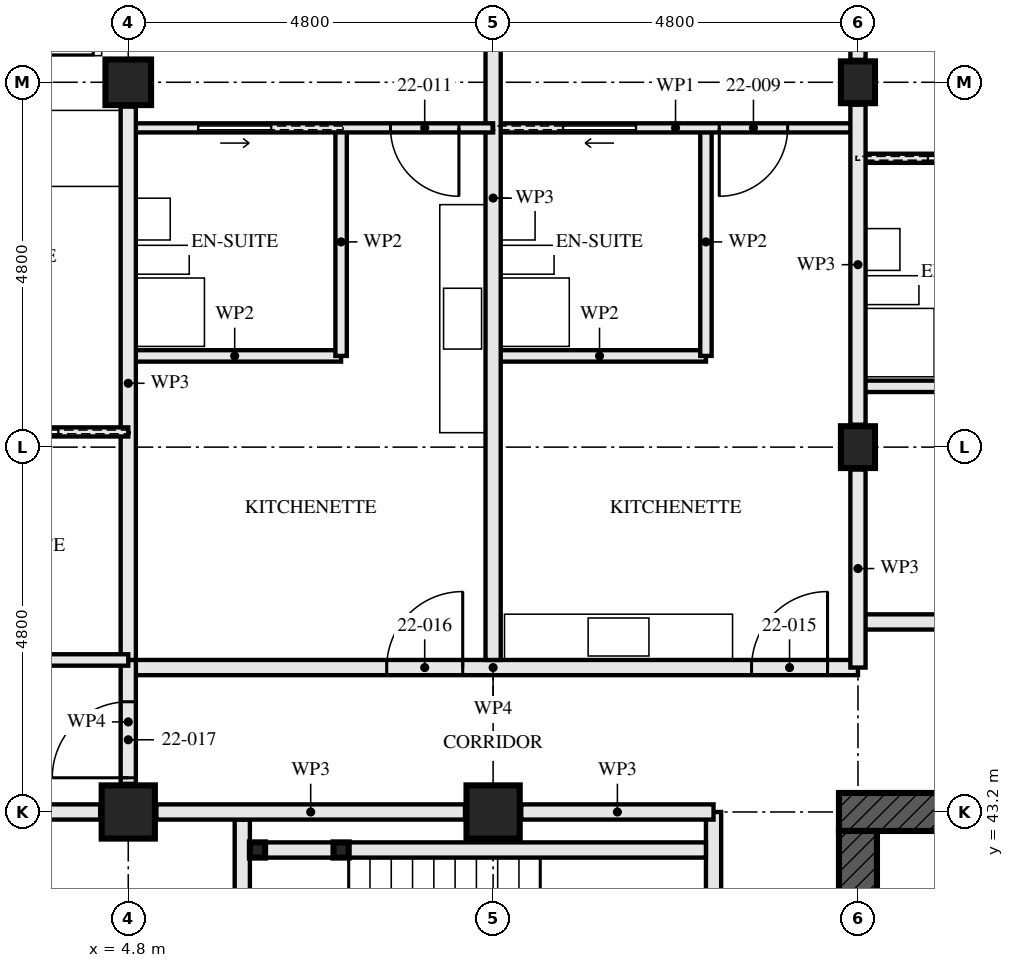
"""IFC4 building model, lengths in metres.
Left out: names, types, materials, properties, quantities, classifications, styles, units other than length and angle.
Written with IfcOpenShell. Run it as: python <this file> out.ifc"""

import sys

from ifc_helpers import new_model, si_unit, direction, frame, frame_2d, origin, origin_2d, place, context, subcontext, project, spatial, rectangle, hollow_rectangle, i_section, extrude, element, fill, save


model = new_model("IFC4")
c1 = context("Model", 3, precision=1e-05, world=origin(), true_north=direction((0.0, 1.0)))
c2 = subcontext(c1, "Body", "Model", "MODEL_VIEW")
j1 = project(units=[si_unit("LENGTHUNIT", "METRE"), si_unit("PLANEANGLEUNIT", "RADIAN")], contexts=[c1])
p1 = place(None, origin())
s1 = spatial("IfcSite", under=j1, at=p1, CompositionType="ELEMENT")
p2 = place(p1, origin())
s2 = spatial("IfcBuilding", under=s1, at=p2, CompositionType="ELEMENT")
p3 = place(p2, frame((0.0, 0.0, 84.0)))
s3 = spatial("IfcBuildingStorey", under=s2, at=p3, CompositionType="ELEMENT", Elevation=84.0)
p4 = place(p3, frame((4.8, 43.2, 0.0), z_axis=(0.0, 0.0, 1.0), x_axis=(0.0, 1.0, 0.0)))
e1 = element("IfcColumn", 1, at=p4, inside=s3, PredefinedType="COLUMN", context=c2, shape_type="SweptSolid", body=[
    extrude(hollow_rectangle(XDim=0.7, YDim=0.7, WallThickness=0.06, at=origin_2d()), origin(), (0.0, 0.0, 1.0), 3.5),
])
p5 = place(p3, frame((4.8, 52.8, 0.0), z_axis=(0.0, 0.0, 1.0), x_axis=(0.0, 1.0, 0.0)))
e2 = element("IfcColumn", 2, at=p5, inside=s3, PredefinedType="COLUMN", context=c2, shape_type="SweptSolid", body=[
    extrude(hollow_rectangle(XDim=0.6, YDim=0.6, WallThickness=0.05, at=origin_2d()), origin(), (0.0, 0.0, 1.0), 3.5),
])
p6 = place(p3, frame((9.6, 43.2, 0.0), z_axis=(0.0, 0.0, 1.0), x_axis=(0.0, 1.0, 0.0)))
e3 = element("IfcColumn", 3, at=p6, inside=s3, PredefinedType="COLUMN", context=c2, shape_type="SweptSolid", body=[
    extrude(hollow_rectangle(XDim=0.7, YDim=0.7, WallThickness=0.06, at=origin_2d()), origin(), (0.0, 0.0, 1.0), 3.5),
])
for number, where, z_axis, x_axis in (
    (4, (14.4, 48.0, 0.0), (0.0, 0.0, 1.0), (1.0, 0.0, 0.0)),
    (5, (14.4, 52.8, 0.0), (0.0, 0.0, 1.0), (1.0, 0.0, 0.0)),
):
    element("IfcColumn", number, at=place(p3, frame(where, z_axis=z_axis, x_axis=x_axis)), inside=s3, PredefinedType="COLUMN", context=c2, shape_type="SweptSolid", body=[
        extrude(i_section(OverallWidth=0.448, OverallDepth=0.55, WebThickness=0.072, FlangeThickness=0.115, FilletRadius=0.015, at=origin_2d()), origin(), (0.0, 0.0, 1.0), 3.5),
    ])
p7 = place(p3, frame((29.05, 43.2, -0.17), z_axis=(0.0, 0.0, 1.0), x_axis=(-1.0, 0.0, 0.0)))
e6 = element("IfcWall", 6, at=p7, inside=s3, PredefinedType="SHEAR", context=c2, shape_type="SweptSolid", body=[
    extrude(rectangle(XDim=14.9, YDim=0.5, at=frame_2d((7.45, 0.0))), origin(), (0.0, 0.0, 1.0), 3.5),
])
p8 = place(p7, frame((6.85, 0.0, 0.17)))
e7 = element("IfcOpeningElement", 7, at=p8, cuts=e6, PredefinedType="OPENING", context=c2, shape_type="SweptSolid", body=[
    extrude(rectangle(XDim=1.2, YDim=2.1, at=frame_2d((0.6, 1.05))), frame((0.0, 0.26, 0.0), z_axis=(0.0, -1.0, 0.0), x_axis=(1.0, 0.0, 0.0)), (0.0, 0.0, 1.0), 0.521),
])
p9 = place(p3, frame((14.4, 42.95, -0.17), z_axis=(0.0, 0.0, 1.0), x_axis=(0.0, -1.0, 0.0)))
e8 = element("IfcWall", 8, at=p9, inside=s3, PredefinedType="SHEAR", context=c2, shape_type="SweptSolid", body=[
    extrude(rectangle(XDim=13.9, YDim=0.5, at=frame_2d((6.95, 0.0))), origin(), (0.0, 0.0, 1.0), 3.5),
])
p10 = place(p9, frame((6.35, 0.0, 0.17)))
e9 = element("IfcOpeningElement", 9, at=p10, cuts=e8, PredefinedType="OPENING", context=c2, shape_type="SweptSolid", body=[
    extrude(rectangle(XDim=1.2, YDim=2.1, at=frame_2d((0.6, 1.05))), frame((0.0, 0.26, 0.0), z_axis=(0.0, -1.0, 0.0), x_axis=(1.0, 0.0, 0.0)), (0.0, 0.0, 1.0), 0.521),
])
for number, where, z_axis, x_axis in (
    (10, (6.5, 42.7, 0.0), (0.0, 0.0, 1.0), (1.0, 0.0, 0.0)),
    (11, (7.6, 42.7, 0.0), (0.0, 0.0, 1.0), (1.0, 0.0, 0.0)),
):
    element("IfcColumn", number, at=place(p3, frame(where, z_axis=z_axis, x_axis=x_axis)), inside=s3, PredefinedType="COLUMN", context=c2, shape_type="SweptSolid", body=[
        extrude(hollow_rectangle(XDim=0.2, YDim=0.2, WallThickness=0.008, at=origin_2d()), origin(), (0.0, 0.0, 1.0), 3.33),
    ])
p11 = place(p3, frame((6.6, 42.7, 0.0), z_axis=(0.0, 0.0, 1.0), x_axis=(1.0, 0.0, 0.0)))
e12 = element("IfcWall", 12, at=p11, inside=s3, PredefinedType="SOLIDWALL", context=c2, shape_type="SweptSolid", body=[
    extrude(rectangle(XDim=0.9, YDim=0.2, at=frame_2d((0.45, 0.0))), origin(), (0.0, 0.0, 1.0), 2.99),
])
p12 = place(p3, frame((7.7, 42.7, 0.0), z_axis=(0.0, 0.0, 1.0), x_axis=(1.0, 0.0, 0.0)))
e13 = element("IfcWall", 13, at=p12, inside=s3, PredefinedType="SOLIDWALL", context=c2, shape_type="SweptSolid", body=[
    extrude(rectangle(XDim=4.7, YDim=0.2, at=frame_2d((2.35, 0.0))), origin(), (0.0, 0.0, 1.0), 2.99),
])
p13 = place(p3, frame((6.3, 43.1, 0.0), z_axis=(0.0, 0.0, 1.0), x_axis=(0.0, -1.0, 0.0)))
e14 = element("IfcWall", 14, at=p13, inside=s3, PredefinedType="SOLIDWALL", context=c2, shape_type="SweptSolid", body=[
    extrude(rectangle(XDim=3.3, YDim=0.2, at=frame_2d((1.65, 0.0))), origin(), (0.0, 0.0, 1.0), 3.33),
])
p14 = place(p3, frame((12.5, 43.2, 0.0), z_axis=(0.0, 0.0, 1.0), x_axis=(0.0, -1.0, 0.0)))
e15 = element("IfcWall", 15, at=p14, inside=s3, PredefinedType="PARTITIONING", context=c2, shape_type="SweptSolid", body=[
    extrude(rectangle(XDim=12.4, YDim=0.2, at=frame_2d((6.2, 0.0))), origin(), (0.0, 0.0, 1.0), 2.55),
])
p15 = place(p14, frame((1.4, 0.0, 0.0)))
e16 = element("IfcOpeningElement", 16, at=p15, cuts=e15, PredefinedType="OPENING", context=c2, shape_type="SweptSolid", body=[
    extrude(rectangle(XDim=1.0, YDim=2.1, at=frame_2d((0.5, 1.05))), frame((0.0, 0.111, 0.0), z_axis=(0.0, -1.0, 0.0), x_axis=(1.0, 0.0, 0.0)), (0.0, 0.0, 1.0), 0.221),
])
p16 = place(p14, frame((5.2, 0.0, 0.0)))
e17 = element("IfcOpeningElement", 17, at=p16, cuts=e15, PredefinedType="OPENING", context=c2, shape_type="SweptSolid", body=[
    extrude(rectangle(XDim=1.0, YDim=2.1, at=frame_2d((0.5, 1.05))), frame((0.0, 0.111, 0.0), z_axis=(0.0, -1.0, 0.0), x_axis=(1.0, 0.0, 0.0)), (0.0, 0.0, 1.0), 0.221),
])
p17 = place(p3, frame((12.4, 52.2, 0.0), z_axis=(0.0, 0.0, 1.0), x_axis=(0.0, -1.0, 0.0)))
e18 = element("IfcWall", 18, at=p17, inside=s3, PredefinedType="PARTITIONING", context=c2, shape_type="SweptSolid", body=[
    extrude(rectangle(XDim=3.0, YDim=0.15, at=frame_2d((1.5, 0.0))), origin(), (0.0, 0.0, 1.0), 3.33),
])
p18 = place(p3, frame((12.4, 49.2, 0.0), z_axis=(0.0, 0.0, 1.0), x_axis=(-1.0, 0.0, 0.0)))
e19 = element("IfcWall", 19, at=p18, inside=s3, PredefinedType="PARTITIONING", context=c2, shape_type="SweptSolid", body=[
    extrude(rectangle(XDim=2.8, YDim=0.15, at=frame_2d((1.4, 0.0))), origin(), (0.0, 0.0, 1.0), 3.33),
])
p19 = place(p3, frame((14.4, 52.2, 0.0), z_axis=(0.0, 0.0, 1.0), x_axis=(-1.0, 0.0, 0.0)))
e20 = element("IfcWall", 20, at=p19, inside=s3, PredefinedType="PARTITIONING", context=c2, shape_type="SweptSolid", body=[
    extrude(rectangle(XDim=4.8, YDim=0.12, at=frame_2d((2.4, 0.0))), origin(), (0.0, 0.0, 1.0), 3.33),
])
p20 = place(p19, frame((0.925, 0.0, 0.0)))
e21 = element("IfcOpeningElement", 21, at=p20, cuts=e20, PredefinedType="OPENING", context=c2, shape_type="SweptSolid", body=[
    extrude(rectangle(XDim=0.9, YDim=2.1, at=frame_2d((0.45, 1.05))), frame((0.0, 0.071, 0.0), z_axis=(0.0, -1.0, 0.0), x_axis=(1.0, 0.0, 0.0)), (0.0, 0.0, 1.0), 0.141),
])
p21 = place(p19, frame((2.925, 0.0, 0.0)))
e22 = element("IfcOpeningElement", 22, at=p21, cuts=e20, PredefinedType="OPENING", context=c2, shape_type="SweptSolid", body=[
    extrude(rectangle(XDim=0.95, YDim=2.1, at=frame_2d((0.475, 1.05))), frame((0.0, 0.071, 0.0), z_axis=(0.0, -1.0, 0.0), x_axis=(1.0, 0.0, 0.0)), (0.0, 0.0, 1.0), 0.141),
])
p22 = place(p3, frame((9.6, 57.353, 0.0), z_axis=(0.0, 0.0, 1.0), x_axis=(0.0, -1.0, 0.0)))
e23 = element("IfcWall", 23, at=p22, inside=s3, PredefinedType="PARTITIONING", context=c2, shape_type="SweptSolid", body=[
    extrude(rectangle(XDim=12.153, YDim=0.2, at=frame_2d((6.077, 0.0))), origin(), (0.0, 0.0, 1.0), 2.55),
])
p23 = place(p3, frame((7.6, 52.2, 0.0), z_axis=(0.0, 0.0, 1.0), x_axis=(0.0, -1.0, 0.0)))
e24 = element("IfcWall", 24, at=p23, inside=s3, PredefinedType="PARTITIONING", context=c2, shape_type="SweptSolid", body=[
    extrude(rectangle(XDim=3.0, YDim=0.15, at=frame_2d((1.5, 0.0))), origin(), (0.0, 0.0, 1.0), 3.33),
])
p24 = place(p3, frame((7.6, 49.2, 0.0), z_axis=(0.0, 0.0, 1.0), x_axis=(-1.0, 0.0, 0.0)))
e25 = element("IfcWall", 25, at=p24, inside=s3, PredefinedType="PARTITIONING", context=c2, shape_type="SweptSolid", body=[
    extrude(rectangle(XDim=2.8, YDim=0.15, at=frame_2d((1.4, 0.0))), origin(), (0.0, 0.0, 1.0), 3.33),
])
p25 = place(p3, frame((9.6, 52.2, 0.0), z_axis=(0.0, 0.0, 1.0), x_axis=(-1.0, 0.0, 0.0)))
e26 = element("IfcWall", 26, at=p25, inside=s3, PredefinedType="PARTITIONING", context=c2, shape_type="SweptSolid", body=[
    extrude(rectangle(XDim=4.8, YDim=0.12, at=frame_2d((2.4, 0.0))), origin(), (0.0, 0.0, 1.0), 3.33),
])
p26 = place(p25, frame((0.45, 0.0, 0.0)))
e27 = element("IfcOpeningElement", 27, at=p26, cuts=e26, PredefinedType="OPENING", context=c2, shape_type="SweptSolid", body=[
    extrude(rectangle(XDim=0.9, YDim=2.1, at=frame_2d((0.45, 1.05))), frame((0.0, 0.071, 0.0), z_axis=(0.0, -1.0, 0.0), x_axis=(1.0, 0.0, 0.0)), (0.0, 0.0, 1.0), 0.141),
])
p27 = place(p25, frame((2.925, 0.0, 0.0)))
e28 = element("IfcOpeningElement", 28, at=p27, cuts=e26, PredefinedType="OPENING", context=c2, shape_type="SweptSolid", body=[
    extrude(rectangle(XDim=0.95, YDim=2.1, at=frame_2d((0.475, 1.05))), frame((0.0, 0.071, 0.0), z_axis=(0.0, -1.0, 0.0), x_axis=(1.0, 0.0, 0.0)), (0.0, 0.0, 1.0), 0.141),
])
p28 = place(p3, frame((4.8, 52.48, 0.0), z_axis=(0.0, 0.0, 1.0), x_axis=(0.0, -1.0, 0.0)))
e29 = element("IfcWall", 29, at=p28, inside=s3, PredefinedType="PARTITIONING", context=c2, shape_type="SweptSolid", body=[
    extrude(rectangle(XDim=7.28, YDim=0.2, at=frame_2d((3.64, 0.0))), origin(), (0.0, 0.0, 1.0), 2.55),
])
p29 = place(p3, frame((4.8, 45.2, 0.0), z_axis=(0.0, 0.0, 1.0), x_axis=(-1.0, 0.0, 0.0)))
e30 = element("IfcWall", 30, at=p29, inside=s3, PredefinedType="PARTITIONING", context=c2, shape_type="SweptSolid", body=[
    extrude(rectangle(XDim=2.8, YDim=0.15, at=frame_2d((1.4, 0.0))), origin(), (0.0, 0.0, 1.0), 3.33),
])
p30 = place(p3, frame((4.8, 48.2, 0.0), z_axis=(0.0, 0.0, 1.0), x_axis=(-1.0, 0.0, 0.0)))
e31 = element("IfcWall", 31, at=p30, inside=s3, PredefinedType="PARTITIONING", context=c2, shape_type="SweptSolid", body=[
    extrude(rectangle(XDim=4.553, YDim=0.12, at=frame_2d((2.276, 0.0))), origin(), (0.0, 0.0, 1.0), 3.33),
])
p31 = place(p30, frame((2.975, 0.0, 0.0)))
e32 = element("IfcOpeningElement", 32, at=p31, cuts=e31, PredefinedType="OPENING", context=c2, shape_type="SweptSolid", body=[
    extrude(rectangle(XDim=0.9, YDim=2.1, at=frame_2d((0.45, 1.05))), frame((0.0, 0.071, 0.0), z_axis=(0.0, -1.0, 0.0), x_axis=(1.0, 0.0, 0.0)), (0.0, 0.0, 1.0), 0.141),
])
p32 = place(p30, frame((0.925, 0.0, 0.0)))
e33 = element("IfcOpeningElement", 33, at=p32, cuts=e31, PredefinedType="OPENING", context=c2, shape_type="SweptSolid", body=[
    extrude(rectangle(XDim=0.95, YDim=2.1, at=frame_2d((0.475, 1.05))), frame((0.0, 0.071, 0.0), z_axis=(0.0, -1.0, 0.0), x_axis=(1.0, 0.0, 0.0)), (0.0, 0.0, 1.0), 0.141),
])
p33 = place(p3, frame((14.4, 45.1, 0.0), z_axis=(0.0, 0.0, 1.0), x_axis=(-1.0, 0.0, 0.0)))
e34 = element("IfcWall", 34, at=p33, inside=s3, PredefinedType="PARTITIONING", context=c2, shape_type="SweptSolid", body=[
    extrude(rectangle(XDim=9.6, YDim=0.2, at=frame_2d((4.8, 0.0))), origin(), (0.0, 0.0, 1.0), 3.33),
])
p34 = place(p33, frame((0.4, 0.0, 0.0)))
e35 = element("IfcOpeningElement", 35, at=p34, cuts=e34, PredefinedType="OPENING", context=c2, shape_type="SweptSolid", body=[
    extrude(rectangle(XDim=1.0, YDim=2.1, at=frame_2d((0.5, 1.05))), frame((0.0, 0.111, 0.0), z_axis=(0.0, -1.0, 0.0), x_axis=(1.0, 0.0, 0.0)), (0.0, 0.0, 1.0), 0.221),
])
p35 = place(p33, frame((5.2, 0.0, 0.0)))
e36 = element("IfcOpeningElement", 36, at=p35, cuts=e34, PredefinedType="OPENING", context=c2, shape_type="SweptSolid", body=[
    extrude(rectangle(XDim=1.0, YDim=2.1, at=frame_2d((0.5, 1.05))), frame((0.0, 0.111, 0.0), z_axis=(0.0, -1.0, 0.0), x_axis=(1.0, 0.0, 0.0)), (0.0, 0.0, 1.0), 0.221),
])
p36 = place(p3, frame((4.8, 45.2, 0.0), z_axis=(0.0, 0.0, 1.0), x_axis=(0.0, -1.0, 0.0)))
e37 = element("IfcWall", 37, at=p36, inside=s3, PredefinedType="PARTITIONING", context=c2, shape_type="SweptSolid", body=[
    extrude(rectangle(XDim=1.63, YDim=0.2, at=frame_2d((0.815, 0.0))), origin(), (0.0, 0.0, 1.0), 3.33),
])
p37 = place(p36, frame((0.55, 0.0, 0.0)))
e38 = element("IfcOpeningElement", 38, at=p37, cuts=e37, PredefinedType="OPENING", context=c2, shape_type="SweptSolid", body=[
    extrude(rectangle(XDim=1.0, YDim=2.1, at=frame_2d((0.5, 1.05))), frame((0.0, 0.111, 0.0), z_axis=(0.0, -1.0, 0.0), x_axis=(1.0, 0.0, 0.0)), (0.0, 0.0, 1.0), 0.221),
])
p38 = place(p3, frame((17.2, 48.8, 0.0), z_axis=(0.0, 0.0, 1.0), x_axis=(-1.0, 0.0, 0.0)))
e39 = element("IfcWall", 39, at=p38, inside=s3, PredefinedType="PARTITIONING", context=c2, shape_type="SweptSolid", body=[
    extrude(rectangle(XDim=2.8, YDim=0.15, at=frame_2d((1.4, 0.0))), origin(), (0.0, 0.0, 1.0), 3.33),
])
p39 = place(p3, frame((19.2, 51.8, 0.0), z_axis=(0.0, 0.0, 1.0), x_axis=(-1.0, 0.0, 0.0)))
e40 = element("IfcWall", 40, at=p39, inside=s3, PredefinedType="PARTITIONING", context=c2, shape_type="SweptSolid", body=[
    extrude(rectangle(XDim=4.8, YDim=0.12, at=frame_2d((2.4, 0.0))), origin(), (0.0, 0.0, 1.0), 3.33),
])
p40 = place(p39, frame((0.45, 0.0, 0.0)))
e41 = element("IfcOpeningElement", 41, at=p40, cuts=e40, PredefinedType="OPENING", context=c2, shape_type="SweptSolid", body=[
    extrude(rectangle(XDim=0.9, YDim=2.1, at=frame_2d((0.45, 1.05))), frame((0.0, 0.071, 0.0), z_axis=(0.0, -1.0, 0.0), x_axis=(1.0, 0.0, 0.0)), (0.0, 0.0, 1.0), 0.141),
])
p41 = place(p39, frame((2.925, 0.0, 0.0)))
e42 = element("IfcOpeningElement", 42, at=p41, cuts=e40, PredefinedType="OPENING", context=c2, shape_type="SweptSolid", body=[
    extrude(rectangle(XDim=0.95, YDim=2.1, at=frame_2d((0.475, 1.05))), frame((0.0, 0.071, 0.0), z_axis=(0.0, -1.0, 0.0), x_axis=(1.0, 0.0, 0.0)), (0.0, 0.0, 1.0), 0.141),
])
p42 = place(p3, frame((26.8, 45.7, 0.0), z_axis=(0.0, 0.0, 1.0), x_axis=(-1.0, 0.0, 0.0)))
e43 = element("IfcWall", 43, at=p42, inside=s3, PredefinedType="PARTITIONING", context=c2, shape_type="SweptSolid", body=[
    extrude(rectangle(XDim=12.4, YDim=0.2, at=frame_2d((6.2, 0.0))), origin(), (0.0, 0.0, 1.0), 3.33),
])
p43 = place(p42, frame((3.2, 0.0, 0.0)))
e44 = element("IfcOpeningElement", 44, at=p43, cuts=e43, PredefinedType="OPENING", context=c2, shape_type="SweptSolid", body=[
    extrude(rectangle(XDim=1.0, YDim=2.1, at=frame_2d((0.5, 1.05))), frame((0.0, 0.111, 0.0), z_axis=(0.0, -1.0, 0.0), x_axis=(1.0, 0.0, 0.0)), (0.0, 0.0, 1.0), 0.221),
])
p44 = place(p42, frame((8.0, 0.0, 0.0)))
e45 = element("IfcOpeningElement", 45, at=p44, cuts=e43, PredefinedType="OPENING", context=c2, shape_type="SweptSolid", body=[
    extrude(rectangle(XDim=1.0, YDim=2.1, at=frame_2d((0.5, 1.05))), frame((0.0, 0.111, 0.0), z_axis=(0.0, -1.0, 0.0), x_axis=(1.0, 0.0, 0.0)), (0.0, 0.0, 1.0), 0.221),
])
p45 = place(p3, frame((12.5, 43.2, 0.0), z_axis=(0.0, 0.0, 1.0), x_axis=(-1.0, 0.0, 0.0)))
e46 = element("IfcWall", 46, at=p45, inside=s3, PredefinedType="PARTITIONING", context=c2, shape_type="SweptSolid", body=[
    extrude(rectangle(XDim=2.53, YDim=0.2, at=frame_2d((1.265, 0.0))), origin(), (0.0, 0.0, 1.0), 2.32),
])
p46 = place(p3, frame((9.23, 43.2, 0.0), z_axis=(0.0, 0.0, 1.0), x_axis=(-1.0, 0.0, 0.0)))
e47 = element("IfcWall", 47, at=p46, inside=s3, PredefinedType="PARTITIONING", context=c2, shape_type="SweptSolid", body=[
    extrude(rectangle(XDim=4.06, YDim=0.2, at=frame_2d((2.03, 0.0))), origin(), (0.0, 0.0, 1.0), 2.32),
])
p47 = place(p3, frame((4.43, 43.2, 0.0), z_axis=(0.0, 0.0, 1.0), x_axis=(-1.0, 0.0, 0.0)))
e48 = element("IfcWall", 48, at=p47, inside=s3, PredefinedType="PARTITIONING", context=c2, shape_type="SweptSolid", body=[
    extrude(rectangle(XDim=4.125, YDim=0.2, at=frame_2d((2.063, 0.0))), origin(), (0.0, 0.0, 1.0), 2.32),
])
p48 = place(p3, frame((14.4, 45.1, 0.0), z_axis=(0.0, 0.0, 1.0), x_axis=(0.0, 1.0, 0.0)))
e49 = element("IfcWall", 49, at=p48, inside=s3, PredefinedType="PARTITIONING", context=c2, shape_type="SweptSolid", body=[
    extrude(rectangle(XDim=2.605, YDim=0.2, at=frame_2d((1.302, 0.0))), origin(), (0.0, 0.0, 1.0), 2.32),
])
p49 = place(p3, frame((14.4, 48.295, 0.0), z_axis=(0.0, 0.0, 1.0), x_axis=(0.0, 1.0, 0.0)))
e50 = element("IfcWall", 50, at=p49, inside=s3, PredefinedType="PARTITIONING", context=c2, shape_type="SweptSolid", body=[
    extrude(rectangle(XDim=4.21, YDim=0.2, at=frame_2d((2.105, 0.0))), origin(), (0.0, 0.0, 1.0), 2.32),
])
p50 = place(p3, frame((14.4, 53.095, 0.0), z_axis=(0.0, 0.0, 1.0), x_axis=(0.0, 1.0, 0.0)))
e51 = element("IfcWall", 51, at=p50, inside=s3, PredefinedType="PARTITIONING", context=c2, shape_type="SweptSolid", body=[
    extrude(rectangle(XDim=4.258, YDim=0.2, at=frame_2d((2.129, 0.0))), origin(), (0.0, 0.0, 1.0), 2.32),
])
p51 = place(p20, origin())
e52 = element("IfcDoor", 52, at=p51, inside=s3, OperationType="SINGLE_SWING_LEFT", PredefinedType="DOOR", context=c2, shape_type="SweptSolid", body=[
    extrude(rectangle(XDim=0.9, YDim=2.1, at=frame_2d((0.45, 1.05))), frame((0.0, 0.022, 0.0), z_axis=(0.0, -1.0, 0.0), x_axis=(1.0, 0.0, 0.0)), (0.0, 0.0, 1.0), 0.044),
])
fill(e21, e52)
p52 = place(p21, origin())
e53 = element("IfcDoor", 53, at=p52, inside=s3, OperationType="SLIDING_TO_LEFT", PredefinedType="DOOR", context=c2, shape_type="SweptSolid", body=[
    extrude(rectangle(XDim=0.95, YDim=2.1, at=frame_2d((0.475, 1.05))), frame((0.0, 0.022, 0.0), z_axis=(0.0, -1.0, 0.0), x_axis=(1.0, 0.0, 0.0)), (0.0, 0.0, 1.0), 0.044),
])
fill(e22, e53)
p53 = place(p26, origin())
e54 = element("IfcDoor", 54, at=p53, inside=s3, OperationType="SINGLE_SWING_RIGHT", PredefinedType="DOOR", context=c2, shape_type="SweptSolid", body=[
    extrude(rectangle(XDim=0.9, YDim=2.1, at=frame_2d((0.45, 1.05))), frame((0.0, 0.022, 0.0), z_axis=(0.0, -1.0, 0.0), x_axis=(1.0, 0.0, 0.0)), (0.0, 0.0, 1.0), 0.044),
])
fill(e27, e54)
p54 = place(p27, origin())
e55 = element("IfcDoor", 55, at=p54, inside=s3, OperationType="SLIDING_TO_RIGHT", PredefinedType="DOOR", context=c2, shape_type="SweptSolid", body=[
    extrude(rectangle(XDim=0.95, YDim=2.1, at=frame_2d((0.475, 1.05))), frame((0.0, 0.022, 0.0), z_axis=(0.0, -1.0, 0.0), x_axis=(1.0, 0.0, 0.0)), (0.0, 0.0, 1.0), 0.044),
])
fill(e28, e55)
p55 = place(p32, origin())
e56 = element("IfcDoor", 56, at=p55, inside=s3, OperationType="SLIDING_TO_RIGHT", PredefinedType="DOOR", context=c2, shape_type="SweptSolid", body=[
    extrude(rectangle(XDim=0.95, YDim=2.1, at=frame_2d((0.475, 1.05))), frame((0.0, 0.022, 0.0), z_axis=(0.0, -1.0, 0.0), x_axis=(1.0, 0.0, 0.0)), (0.0, 0.0, 1.0), 0.044),
])
fill(e33, e56)
p56 = place(p34, frame((1.0, 0.0, 0.0), z_axis=(0.0, 0.0, 1.0), x_axis=(-1.0, 0.0, 0.0)))
e57 = element("IfcDoor", 57, at=p56, inside=s3, OperationType="SINGLE_SWING_LEFT", PredefinedType="DOOR", context=c2, shape_type="SweptSolid", body=[
    extrude(rectangle(XDim=1.0, YDim=2.1, at=frame_2d((0.5, 1.05))), frame((0.0, 0.027, 0.0), z_axis=(0.0, -1.0, 0.0), x_axis=(1.0, 0.0, 0.0)), (0.0, 0.0, 1.0), 0.054),
])
fill(e35, e57)
p57 = place(p35, frame((1.0, 0.0, 0.0), z_axis=(0.0, 0.0, 1.0), x_axis=(-1.0, 0.0, 0.0)))
e58 = element("IfcDoor", 58, at=p57, inside=s3, OperationType="SINGLE_SWING_LEFT", PredefinedType="DOOR", context=c2, shape_type="SweptSolid", body=[
    extrude(rectangle(XDim=1.0, YDim=2.1, at=frame_2d((0.5, 1.05))), frame((0.0, 0.027, 0.0), z_axis=(0.0, -1.0, 0.0), x_axis=(1.0, 0.0, 0.0)), (0.0, 0.0, 1.0), 0.054),
])
fill(e36, e58)
p58 = place(p37, frame((1.0, 0.0, 0.0), z_axis=(0.0, 0.0, 1.0), x_axis=(-1.0, 0.0, 0.0)))
e59 = element("IfcDoor", 59, at=p58, inside=s3, OperationType="SINGLE_SWING_RIGHT", PredefinedType="DOOR", context=c2, shape_type="SweptSolid", body=[
    extrude(rectangle(XDim=1.0, YDim=2.1, at=frame_2d((0.5, 1.05))), frame((0.0, 0.027, 0.0), z_axis=(0.0, -1.0, 0.0), x_axis=(1.0, 0.0, 0.0)), (0.0, 0.0, 1.0), 0.054),
])
fill(e38, e59)
p59 = place(p41, origin())
e60 = element("IfcDoor", 60, at=p59, inside=s3, OperationType="SLIDING_TO_LEFT", PredefinedType="DOOR", context=c2, shape_type="SweptSolid", body=[
    extrude(rectangle(XDim=0.95, YDim=2.1, at=frame_2d((0.475, 1.05))), frame((0.0, 0.022, 0.0), z_axis=(0.0, -1.0, 0.0), x_axis=(1.0, 0.0, 0.0)), (0.0, 0.0, 1.0), 0.044),
])
fill(e42, e60)
save(model, sys.argv[1])
